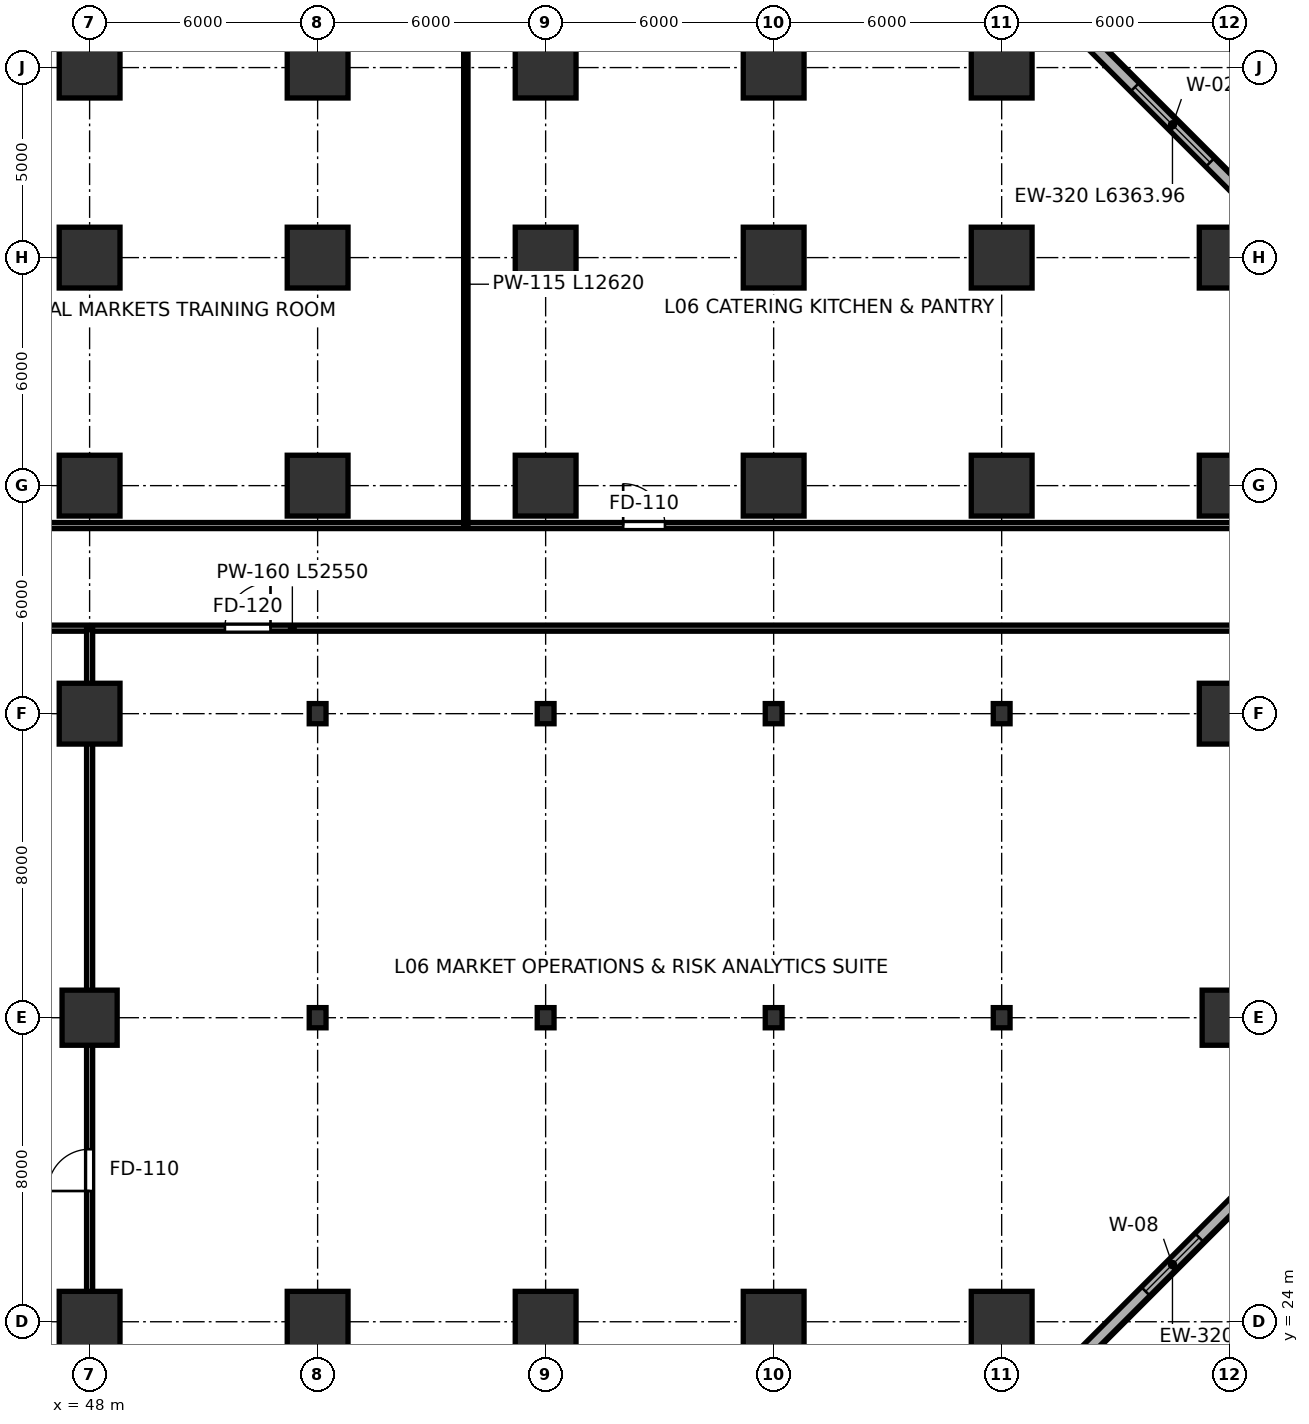
"""IFC4 building model, lengths in metres.
Left out: names, types, materials, properties, quantities, classifications, styles, units other than length and angle.
Written with IfcOpenShell. Run it as: python <this file> out.ifc"""

import sys

from ifc_helpers import new_model, si_unit, direction, frame, frame_2d, origin, origin_2d, place, context, subcontext, project, spatial, rectangle, i_section, extrude, clip, halfspace, source, transform, mapped, element, fill, save


model = new_model("IFC4")
c1 = context("Model", 3, precision=1e-05, world=origin(), true_north=direction((0.0, 1.0)))
c2 = subcontext(c1, "Body", "Model", "MODEL_VIEW")
j1 = project(units=[si_unit("LENGTHUNIT", "METRE"), si_unit("PLANEANGLEUNIT", "RADIAN")], contexts=[c1])
p1 = place(None, origin())
s1 = spatial("IfcSite", under=j1, at=p1, CompositionType="ELEMENT")
p2 = place(p1, origin())
s2 = spatial("IfcBuilding", under=s1, at=p2, CompositionType="ELEMENT")
p3 = place(p2, frame((0.0, 0.0, 28.0)))
s3 = spatial("IfcBuildingStorey", under=s2, at=p3, CompositionType="ELEMENT", Elevation=28.0)
p4 = place(p3, frame((48.0, 24.0, 0.0), z_axis=(-0.07561517764, -0.231975329706, 0.969778217593), x_axis=(0.950764807949, -0.309913342672, 0.0)))
e1 = element("IfcColumn", 1, at=p4, inside=s3, PredefinedType="COLUMN", context=c2, shape_type="Clipping", body=[
    clip(clip(extrude(rectangle(XDim=1.6, YDim=1.6, at=origin_2d()), origin(), (0.0, 0.0, 1.0), 4.95), halfspace(frame((0.0, 0.0, 0.202), z_axis=(0.0, 0.0, -1.0), x_axis=(1.0, 0.0, 0.0)), False)), halfspace(frame((0.0, 0.0, 4.748), z_axis=(0.0, 0.0, 1.0), x_axis=(1.0, 0.0, 0.0)), False)),
])
p5 = place(p3, frame((48.0, 32.0, 0.0), z_axis=(-0.005093110912, -0.234134758899, 0.972190811979), x_axis=(0.999763489518, -0.021747759117, 0.0)))
e2 = element("IfcColumn", 2, at=p5, inside=s3, PredefinedType="COLUMN", context=c2, shape_type="Clipping", body=[
    clip(clip(extrude(rectangle(XDim=1.45, YDim=1.45, at=origin_2d()), origin(), (0.0, 0.0, 1.0), 4.937), halfspace(frame((0.0, 0.0, 0.175), z_axis=(0.0, 0.0, -1.0), x_axis=(1.0, 0.0, 0.0)), False)), halfspace(frame((0.0, 0.0, 4.762), z_axis=(0.0, 0.0, 1.0), x_axis=(1.0, 0.0, 0.0)), False)),
])
p6 = place(p3, frame((48.0, 40.0, 0.0), z_axis=(0.065404532384, -0.235081448976, 0.969772632884), x_axis=(0.963407779641, 0.268040015905, 0.0)))
e3 = element("IfcColumn", 3, at=p6, inside=s3, PredefinedType="COLUMN", context=c2, shape_type="Clipping", body=[
    clip(clip(extrude(rectangle(XDim=1.6, YDim=1.6, at=origin_2d()), origin(), (0.0, 0.0, 1.0), 4.95), halfspace(frame((0.0, 0.0, 0.202), z_axis=(0.0, 0.0, -1.0), x_axis=(1.0, 0.0, 0.0)), False)), halfspace(frame((0.0, 0.0, 4.748), z_axis=(0.0, 0.0, 1.0), x_axis=(1.0, 0.0, 0.0)), False)),
])
p7 = place(p3, frame((48.0, 46.0, 0.0), z_axis=(0.117679189372, -0.235014861511, 0.964841760735), x_axis=(0.894165640865, 0.447736313801, 0.0)))
e4 = element("IfcColumn", 4, at=p7, inside=s3, PredefinedType="COLUMN", context=c2, shape_type="Clipping", body=[
    clip(clip(extrude(rectangle(XDim=1.6, YDim=1.6, at=origin_2d()), origin(), (0.0, 0.0, 1.0), 4.975), halfspace(frame((0.0, 0.0, 0.219), z_axis=(0.0, 0.0, -1.0), x_axis=(1.0, 0.0, 0.0)), False)), halfspace(frame((0.0, 0.0, 4.756), z_axis=(0.0, 0.0, 1.0), x_axis=(1.0, 0.0, 0.0)), False)),
])
m1 = source(origin(), c2, "Body", "SweptSolid", [
    extrude(rectangle(XDim=1.6, YDim=1.6, at=origin_2d()), origin(), (0.0, 0.0, 1.0), 4.599),
])
p8 = place(p3, frame((48.0, 52.0, 0.001), z_axis=(0.0, 0.0, 1.0), x_axis=(1.0, 0.0, 0.0)))
e5 = element("IfcColumn", 5, at=p8, inside=s3, PredefinedType="COLUMN", context=c2, shape_type="MappedRepresentation", body=[
    mapped(m1, transform((0.0, 0.0, 0.0), scale=1.0)),
])
m2 = source(origin(), c2, "Body", "SweptSolid", [
    extrude(rectangle(XDim=1.6, YDim=1.6, at=origin_2d()), origin(), (0.0, 0.0, 1.0), 4.599),
])
p9 = place(p3, frame((48.0, 57.0, 0.001), z_axis=(0.0, 0.0, 1.0), x_axis=(1.0, 0.0, 0.0)))
e6 = element("IfcColumn", 6, at=p9, inside=s3, PredefinedType="COLUMN", context=c2, shape_type="MappedRepresentation", body=[
    mapped(m2, transform((0.0, 0.0, 0.0), scale=1.0)),
])
p10 = place(p3, frame((54.0, 24.0, 0.0), z_axis=(-0.075715593765, -0.28101385218, 0.956712268001), x_axis=(0.965565696682, -0.260159346154, 0.0)))
e7 = element("IfcColumn", 7, at=p10, inside=s3, PredefinedType="COLUMN", context=c2, shape_type="Clipping", body=[
    clip(clip(extrude(rectangle(XDim=1.6, YDim=1.6, at=origin_2d()), origin(), (0.0, 0.0, 1.0), 5.017), halfspace(frame((0.0, 0.0, 0.244), z_axis=(0.0, 0.0, -1.0), x_axis=(1.0, 0.0, 0.0)), False)), halfspace(frame((0.0, 0.0, 4.773), z_axis=(0.0, 0.0, 1.0), x_axis=(1.0, 0.0, 0.0)), False)),
])
m3 = source(origin(), c2, "Body", "SweptSolid", [
    extrude(i_section(OverallWidth=0.442, OverallDepth=0.531, WebThickness=0.066, FlangeThickness=0.106, FilletRadius=0.015, at=origin_2d()), origin(), (0.0, 0.0, 1.0), 4.599),
])
p11 = place(p3, frame((54.0, 32.0, 0.001), z_axis=(0.0, 0.0, 1.0), x_axis=(1.0, 0.0, 0.0)))
e8 = element("IfcColumn", 8, at=p11, inside=s3, PredefinedType="COLUMN", context=c2, shape_type="MappedRepresentation", body=[
    mapped(m3, transform((0.0, 0.0, 0.0), scale=1.0)),
])
p12 = place(p3, frame((54.0, 40.0, 0.0), z_axis=(0.063403888281, -0.28407666906, 0.956702876052), x_axis=(0.975986028976, 0.217833127057, 0.0)))
e9 = element("IfcColumn", 9, at=p12, inside=s3, PredefinedType="COLUMN", context=c2, shape_type="Clipping", body=[
    clip(clip(extrude(i_section(OverallWidth=0.442, OverallDepth=0.531, WebThickness=0.066, FlangeThickness=0.106, FilletRadius=0.015, at=origin_2d()), origin(), (0.0, 0.0, 1.0), 5.017), halfspace(frame((0.0, 0.0, 0.082), z_axis=(0.0, 0.0, -1.0), x_axis=(1.0, 0.0, 0.0)), False)), halfspace(frame((0.0, 0.0, 4.936), z_axis=(0.0, 0.0, 1.0), x_axis=(1.0, 0.0, 0.0)), False)),
])
p13 = place(p3, frame((54.0, 46.0, 0.0), z_axis=(0.114947559248, -0.283785865524, 0.951973025433), x_axis=(0.92685381155, 0.37542244474, 0.0)))
e10 = element("IfcColumn", 10, at=p13, inside=s3, PredefinedType="COLUMN", context=c2, shape_type="Clipping", body=[
    clip(clip(extrude(rectangle(XDim=1.6, YDim=1.6, at=origin_2d()), origin(), (0.0, 0.0, 1.0), 5.042), halfspace(frame((0.0, 0.0, 0.258), z_axis=(0.0, 0.0, -1.0), x_axis=(1.0, 0.0, 0.0)), False)), halfspace(frame((0.0, 0.0, 4.784), z_axis=(0.0, 0.0, 1.0), x_axis=(1.0, 0.0, 0.0)), False)),
])
p14 = place(p3, frame((54.0, 52.0, 0.001), z_axis=(0.0, 0.0, 1.0), x_axis=(1.0, 0.0, 0.0)))
e11 = element("IfcColumn", 11, at=p14, inside=s3, PredefinedType="COLUMN", context=c2, shape_type="MappedRepresentation", body=[
    mapped(m1, transform((0.0, 0.0, 0.0), scale=1.0)),
])
p15 = place(p3, frame((54.0, 57.0, 0.001), z_axis=(0.0, 0.0, 1.0), x_axis=(1.0, 0.0, 0.0)))
e12 = element("IfcColumn", 12, at=p15, inside=s3, PredefinedType="COLUMN", context=c2, shape_type="MappedRepresentation", body=[
    mapped(m2, transform((0.0, 0.0, 0.0), scale=1.0)),
])
p16 = place(p3, frame((60.0, 24.0, 0.0), z_axis=(-0.075626493605, -0.327938316475, 0.941667188582), x_axis=(0.974424764565, -0.224713992004, 0.0)))
e13 = element("IfcColumn", 13, at=p16, inside=s3, PredefinedType="COLUMN", context=c2, shape_type="Clipping", body=[
    clip(clip(extrude(rectangle(XDim=1.6, YDim=1.6, at=origin_2d()), origin(), (0.0, 0.0, 1.0), 5.097), halfspace(frame((0.0, 0.0, 0.287), z_axis=(0.0, 0.0, -1.0), x_axis=(1.0, 0.0, 0.0)), False)), halfspace(frame((0.0, 0.0, 4.811), z_axis=(0.0, 0.0, 1.0), x_axis=(1.0, 0.0, 0.0)), False)),
])
p17 = place(p3, frame((60.0, 32.0, 0.0), z_axis=(-0.007201190316, -0.330198579943, 0.943884018649), x_axis=(0.999762275855, -0.021803480863, 0.0)))
e14 = element("IfcColumn", 14, at=p17, inside=s3, PredefinedType="COLUMN", context=c2, shape_type="Clipping", body=[
    clip(clip(extrude(i_section(OverallWidth=0.442, OverallDepth=0.531, WebThickness=0.066, FlangeThickness=0.106, FilletRadius=0.015, at=origin_2d()), origin(), (0.0, 0.0, 1.0), 5.085), halfspace(frame((0.0, 0.0, 0.094), z_axis=(0.0, 0.0, -1.0), x_axis=(1.0, 0.0, 0.0)), False)), halfspace(frame((0.0, 0.0, 4.992), z_axis=(0.0, 0.0, 1.0), x_axis=(1.0, 0.0, 0.0)), False)),
])
p18 = place(p3, frame((60.0, 40.0, 0.0), z_axis=(0.061257285985, -0.330952186205, 0.94165715383), x_axis=(0.983298043028, 0.182002633435, 0.0)))
e15 = element("IfcColumn", 15, at=p18, inside=s3, PredefinedType="COLUMN", context=c2, shape_type="Clipping", body=[
    clip(clip(extrude(i_section(OverallWidth=0.442, OverallDepth=0.531, WebThickness=0.066, FlangeThickness=0.106, FilletRadius=0.015, at=origin_2d()), origin(), (0.0, 0.0, 1.0), 5.097), halfspace(frame((0.0, 0.0, 0.096), z_axis=(0.0, 0.0, -1.0), x_axis=(1.0, 0.0, 0.0)), False)), halfspace(frame((0.0, 0.0, 5.002), z_axis=(0.0, 0.0, 1.0), x_axis=(1.0, 0.0, 0.0)), False)),
])
for number, where, z_axis, x_axis in (
    (16, (60.0, 46.0, 0.001), (0.0, 0.0, 1.0), (1.0, 0.0, 0.0)),
    (17, (60.0, 52.0, 0.001), (0.0, 0.0, 1.0), (1.0, 0.0, 0.0)),
):
    element("IfcColumn", number, at=place(p3, frame(where, z_axis=z_axis, x_axis=x_axis)), inside=s3, PredefinedType="COLUMN", context=c2, shape_type="MappedRepresentation", body=[
        mapped(m1, transform((0.0, 0.0, 0.0), scale=1.0)),
    ])
for number, where, z_axis, x_axis in (
    (18, (60.0, 57.0, 0.001), (0.0, 0.0, 1.0), (1.0, 0.0, 0.0)),
    (19, (66.0, 24.0, 0.001), (0.0, 0.0, 1.0), (1.0, 0.0, 0.0)),
):
    element("IfcColumn", number, at=place(p3, frame(where, z_axis=z_axis, x_axis=x_axis)), inside=s3, PredefinedType="COLUMN", context=c2, shape_type="MappedRepresentation", body=[
        mapped(m2, transform((0.0, 0.0, 0.0), scale=1.0)),
    ])
for number, where, z_axis, x_axis in (
    (20, (66.0, 32.0, 0.001), (0.0, 0.0, 1.0), (1.0, 0.0, 0.0)),
    (21, (66.0, 40.0, 0.001), (0.0, 0.0, 1.0), (1.0, 0.0, 0.0)),
):
    element("IfcColumn", number, at=place(p3, frame(where, z_axis=z_axis, x_axis=x_axis)), inside=s3, PredefinedType="COLUMN", context=c2, shape_type="MappedRepresentation", body=[
        mapped(m3, transform((0.0, 0.0, 0.0), scale=1.0)),
    ])
for number, where, z_axis, x_axis in (
    (22, (66.0, 46.0, 0.001), (0.0, 0.0, 1.0), (1.0, 0.0, 0.0)),
    (23, (66.0, 52.0, 0.001), (0.0, 0.0, 1.0), (1.0, 0.0, 0.0)),
):
    element("IfcColumn", number, at=place(p3, frame(where, z_axis=z_axis, x_axis=x_axis)), inside=s3, PredefinedType="COLUMN", context=c2, shape_type="MappedRepresentation", body=[
        mapped(m1, transform((0.0, 0.0, 0.0), scale=1.0)),
    ])
for number, where, z_axis, x_axis in (
    (24, (66.0, 57.0, 0.001), (0.0, 0.0, 1.0), (1.0, 0.0, 0.0)),
    (25, (72.0, 24.0, 0.001), (0.0, 0.0, 1.0), (1.0, 0.0, 0.0)),
):
    element("IfcColumn", number, at=place(p3, frame(where, z_axis=z_axis, x_axis=x_axis)), inside=s3, PredefinedType="COLUMN", context=c2, shape_type="MappedRepresentation", body=[
        mapped(m2, transform((0.0, 0.0, 0.0), scale=1.0)),
    ])
for number, where, z_axis, x_axis in (
    (26, (72.0, 32.0, 0.001), (0.0, 0.0, 1.0), (1.0, 0.0, 0.0)),
    (27, (72.0, 40.0, 0.001), (0.0, 0.0, 1.0), (1.0, 0.0, 0.0)),
):
    element("IfcColumn", number, at=place(p3, frame(where, z_axis=z_axis, x_axis=x_axis)), inside=s3, PredefinedType="COLUMN", context=c2, shape_type="MappedRepresentation", body=[
        mapped(m3, transform((0.0, 0.0, 0.0), scale=1.0)),
    ])
for number, where, z_axis, x_axis in (
    (28, (72.0, 46.0, 0.001), (0.0, 0.0, 1.0), (1.0, 0.0, 0.0)),
    (29, (72.0, 52.0, 0.001), (0.0, 0.0, 1.0), (1.0, 0.0, 0.0)),
):
    element("IfcColumn", number, at=place(p3, frame(where, z_axis=z_axis, x_axis=x_axis)), inside=s3, PredefinedType="COLUMN", context=c2, shape_type="MappedRepresentation", body=[
        mapped(m1, transform((0.0, 0.0, 0.0), scale=1.0)),
    ])
p19 = place(p3, frame((72.0, 57.0, 0.001), z_axis=(0.0, 0.0, 1.0), x_axis=(1.0, 0.0, 0.0)))
e30 = element("IfcColumn", 30, at=p19, inside=s3, PredefinedType="COLUMN", context=c2, shape_type="MappedRepresentation", body=[
    mapped(m2, transform((0.0, 0.0, 0.0), scale=1.0)),
])
m4 = source(origin(), c2, "Body", "SweptSolid", [
    extrude(rectangle(XDim=1.45, YDim=1.45, at=origin_2d()), origin(), (0.0, 0.0, 1.0), 4.599),
])
p20 = place(p3, frame((78.0, 32.0, 0.001), z_axis=(0.0, 0.0, 1.0), x_axis=(1.0, 0.0, 0.0)))
e31 = element("IfcColumn", 31, at=p20, inside=s3, PredefinedType="COLUMN", context=c2, shape_type="MappedRepresentation", body=[
    mapped(m4, transform((0.0, 0.0, 0.0), scale=1.0)),
])
for number, where, z_axis, x_axis in (
    (32, (78.0, 40.0, 0.001), (0.0, 0.0, 1.0), (1.0, 0.0, 0.0)),
    (33, (78.0, 46.0, 0.001), (0.0, 0.0, 1.0), (1.0, 0.0, 0.0)),
    (34, (78.0, 52.0, 0.001), (0.0, 0.0, 1.0), (1.0, 0.0, 0.0)),
):
    element("IfcColumn", number, at=place(p3, frame(where, z_axis=z_axis, x_axis=x_axis)), inside=s3, PredefinedType="COLUMN", context=c2, shape_type="MappedRepresentation", body=[
        mapped(m2, transform((0.0, 0.0, 0.0), scale=1.0)),
    ])
p21 = place(p3, frame((74.244, 23.256, 0.0), z_axis=(0.0, 0.0, 1.0), x_axis=(0.707106781187, 0.707106781187, 0.0)))
e35 = element("IfcWall", 35, at=p21, inside=s3, PredefinedType="SOLIDWALL", context=c2, shape_type="SweptSolid", body=[
    extrude(rectangle(XDim=6.364, YDim=0.32, at=frame_2d((3.182, 0.0))), origin(), (0.0, 0.0, 1.0), 4.56),
])
p22 = place(p21, frame((2.182, 0.0, 0.65)))
e36 = element("IfcOpeningElement", 36, at=p22, cuts=e35, PredefinedType="OPENING", context=c2, shape_type="SweptSolid", body=[
    extrude(rectangle(XDim=2.0, YDim=2.25, at=frame_2d((1.0, 1.125))), frame((0.0, 0.17, 0.0), z_axis=(0.0, -1.0, 0.0), x_axis=(1.0, 0.0, 0.0)), (0.0, 0.0, 1.0), 0.34),
])
p23 = place(p3, frame((78.744, 53.244, 0.0), z_axis=(0.0, 0.0, 1.0), x_axis=(-0.707106781187, 0.707106781187, 0.0)))
e37 = element("IfcWall", 37, at=p23, inside=s3, PredefinedType="SOLIDWALL", context=c2, shape_type="SweptSolid", body=[
    extrude(rectangle(XDim=6.364, YDim=0.32, at=frame_2d((3.182, 0.0))), origin(), (0.0, 0.0, 1.0), 4.56),
])
p24 = place(p23, frame((1.782, 0.0, 0.65)))
e38 = element("IfcOpeningElement", 38, at=p24, cuts=e37, PredefinedType="OPENING", context=c2, shape_type="SweptSolid", body=[
    extrude(rectangle(XDim=2.8, YDim=2.35, at=frame_2d((1.4, 1.175))), frame((0.0, 0.17, 0.0), z_axis=(0.0, -1.0, 0.0), x_axis=(1.0, 0.0, 0.0)), (0.0, 0.0, 1.0), 0.34),
])
p25 = place(p3, frame((27.06, 42.25, 0.0), z_axis=(0.0, 0.0, 1.0), x_axis=(1.0, 0.0, 0.0)))
e39 = element("IfcWall", 39, at=p25, inside=s3, PredefinedType="PARTITIONING", context=c2, shape_type="SweptSolid", body=[
    extrude(rectangle(XDim=52.55, YDim=0.16, at=frame_2d((26.275, 0.0))), origin(), (0.0, 0.0, 1.0), 3.255),
])
p26 = place(p25, frame((6.5, 0.0, 0.0)))
e40 = element("IfcOpeningElement", 40, at=p26, cuts=e39, PredefinedType="OPENING", context=c2, shape_type="SweptSolid", body=[
    extrude(rectangle(XDim=1.2, YDim=2.2, at=frame_2d((0.6, 1.1))), frame((0.0, 0.09, 0.0), z_axis=(0.0, -1.0, 0.0), x_axis=(1.0, 0.0, 0.0)), (0.0, 0.0, 1.0), 0.18),
])
p27 = place(p25, frame((24.5, 0.0, 0.0)))
e41 = element("IfcOpeningElement", 41, at=p27, cuts=e39, PredefinedType="OPENING", context=c2, shape_type="SweptSolid", body=[
    extrude(rectangle(XDim=1.2, YDim=2.2, at=frame_2d((0.6, 1.1))), frame((0.0, 0.09, 0.0), z_axis=(0.0, -1.0, 0.0), x_axis=(1.0, 0.0, 0.0)), (0.0, 0.0, 1.0), 0.18),
])
p28 = place(p3, frame((27.14, 44.95, 0.0), z_axis=(0.0, 0.0, 1.0), x_axis=(1.0, 0.0, 0.0)))
e42 = element("IfcWall", 42, at=p28, inside=s3, PredefinedType="PARTITIONING", context=c2, shape_type="SweptSolid", body=[
    extrude(rectangle(XDim=52.47, YDim=0.16, at=frame_2d((26.235, 0.0))), origin(), (0.0, 0.0, 1.0), 3.255),
])
p29 = place(p28, frame((17.9, 0.0, 0.0)))
e43 = element("IfcOpeningElement", 43, at=p29, cuts=e42, PredefinedType="OPENING", context=c2, shape_type="SweptSolid", body=[
    extrude(rectangle(XDim=1.1, YDim=2.2, at=frame_2d((0.55, 1.1))), frame((0.0, 0.09, 0.0), z_axis=(0.0, -1.0, 0.0), x_axis=(1.0, 0.0, 0.0)), (0.0, 0.0, 1.0), 0.18),
])
p30 = place(p28, frame((34.9, 0.0, 0.0)))
e44 = element("IfcOpeningElement", 44, at=p30, cuts=e42, PredefinedType="OPENING", context=c2, shape_type="SweptSolid", body=[
    extrude(rectangle(XDim=1.1, YDim=2.2, at=frame_2d((0.55, 1.1))), frame((0.0, 0.09, 0.0), z_axis=(0.0, -1.0, 0.0), x_axis=(1.0, 0.0, 0.0)), (0.0, 0.0, 1.0), 0.18),
])
p31 = place(p3, frame((57.9, 44.99, 0.0), z_axis=(0.0, 0.0, 1.0), x_axis=(0.0, 1.0, 0.0)))
e45 = element("IfcWall", 45, at=p31, inside=s3, PredefinedType="PARTITIONING", context=c2, shape_type="SweptSolid", body=[
    extrude(rectangle(XDim=12.62, YDim=0.115, at=frame_2d((6.31, 0.0))), origin(), (0.0, 0.0, 1.0), 3.792),
])
p32 = place(p3, frame((48.0, 24.44, 0.0), z_axis=(0.0, 0.0, 1.0), x_axis=(0.0, 1.0, 0.0)))
e46 = element("IfcWall", 46, at=p32, inside=s3, PredefinedType="PARTITIONING", context=c2, shape_type="SweptSolid", body=[
    extrude(rectangle(XDim=17.77, YDim=0.16, at=frame_2d((8.885, 0.0))), origin(), (0.0, 0.0, 1.0), 2.505),
])
p33 = place(p32, frame((3.0, 0.0, 0.0)))
e47 = element("IfcOpeningElement", 47, at=p33, cuts=e46, PredefinedType="OPENING", context=c2, shape_type="SweptSolid", body=[
    extrude(rectangle(XDim=1.1, YDim=2.2, at=frame_2d((0.55, 1.1))), frame((0.0, 0.09, 0.0), z_axis=(0.0, -1.0, 0.0), x_axis=(1.0, 0.0, 0.0)), (0.0, 0.0, 1.0), 0.18),
])
m5 = source(origin(), c2, "Body", "SweptSolid", [
    extrude(rectangle(XDim=2.0, YDim=2.25, at=frame_2d((1.0, 1.125))), frame((0.0, 0.03, 0.0), z_axis=(0.0, -1.0, 0.0), x_axis=(1.0, 0.0, 0.0)), (0.0, 0.0, 1.0), 0.06),
])
p34 = place(p22, origin())
e48 = element("IfcWindow", 48, at=p34, inside=s3, PartitioningType="DOUBLE_PANEL_HORIZONTAL", PredefinedType="WINDOW", context=c2, shape_type="MappedRepresentation", body=[
    mapped(m5, transform((0.0, 0.0, 0.0), scale=1.0)),
])
fill(e36, e48)
m6 = source(origin(), c2, "Body", "SweptSolid", [
    extrude(rectangle(XDim=2.8, YDim=2.35, at=frame_2d((1.4, 1.175))), frame((0.0, 0.03, 0.0), z_axis=(0.0, -1.0, 0.0), x_axis=(1.0, 0.0, 0.0)), (0.0, 0.0, 1.0), 0.06),
])
p35 = place(p24, origin())
e49 = element("IfcWindow", 49, at=p35, inside=s3, PartitioningType="DOUBLE_PANEL_VERTICAL", PredefinedType="WINDOW", context=c2, shape_type="MappedRepresentation", body=[
    mapped(m6, transform((0.0, 0.0, 0.0), scale=1.0)),
])
fill(e38, e49)
m7 = source(origin(), c2, "Body", "SweptSolid", [
    extrude(rectangle(XDim=1.2, YDim=2.2, at=frame_2d((0.6, 1.1))), frame((0.0, 0.025, 0.0), z_axis=(0.0, -1.0, 0.0), x_axis=(1.0, 0.0, 0.0)), (0.0, 0.0, 1.0), 0.05),
])
p36 = place(p27, origin())
e50 = element("IfcDoor", 50, at=p36, inside=s3, OperationType="SINGLE_SWING_RIGHT", PredefinedType="DOOR", context=c2, shape_type="MappedRepresentation", body=[
    mapped(m7, transform((0.0, 0.0, 0.0), scale=1.0)),
])
fill(e41, e50)
m8 = source(origin(), c2, "Body", "SweptSolid", [
    extrude(rectangle(XDim=1.1, YDim=2.2, at=frame_2d((0.55, 1.1))), frame((0.0, 0.025, 0.0), z_axis=(0.0, -1.0, 0.0), x_axis=(1.0, 0.0, 0.0)), (0.0, 0.0, 1.0), 0.05),
])
p37 = place(p30, origin())
e51 = element("IfcDoor", 51, at=p37, inside=s3, OperationType="SINGLE_SWING_LEFT", PredefinedType="DOOR", context=c2, shape_type="MappedRepresentation", body=[
    mapped(m8, transform((0.0, 0.0, 0.0), scale=1.0)),
])
fill(e44, e51)
p38 = place(p33, origin())
e52 = element("IfcDoor", 52, at=p38, inside=s3, OperationType="SINGLE_SWING_LEFT", PredefinedType="DOOR", context=c2, shape_type="MappedRepresentation", body=[
    mapped(m8, transform((0.0, 0.0, 0.0), scale=1.0)),
])
fill(e47, e52)
save(model, sys.argv[1])
